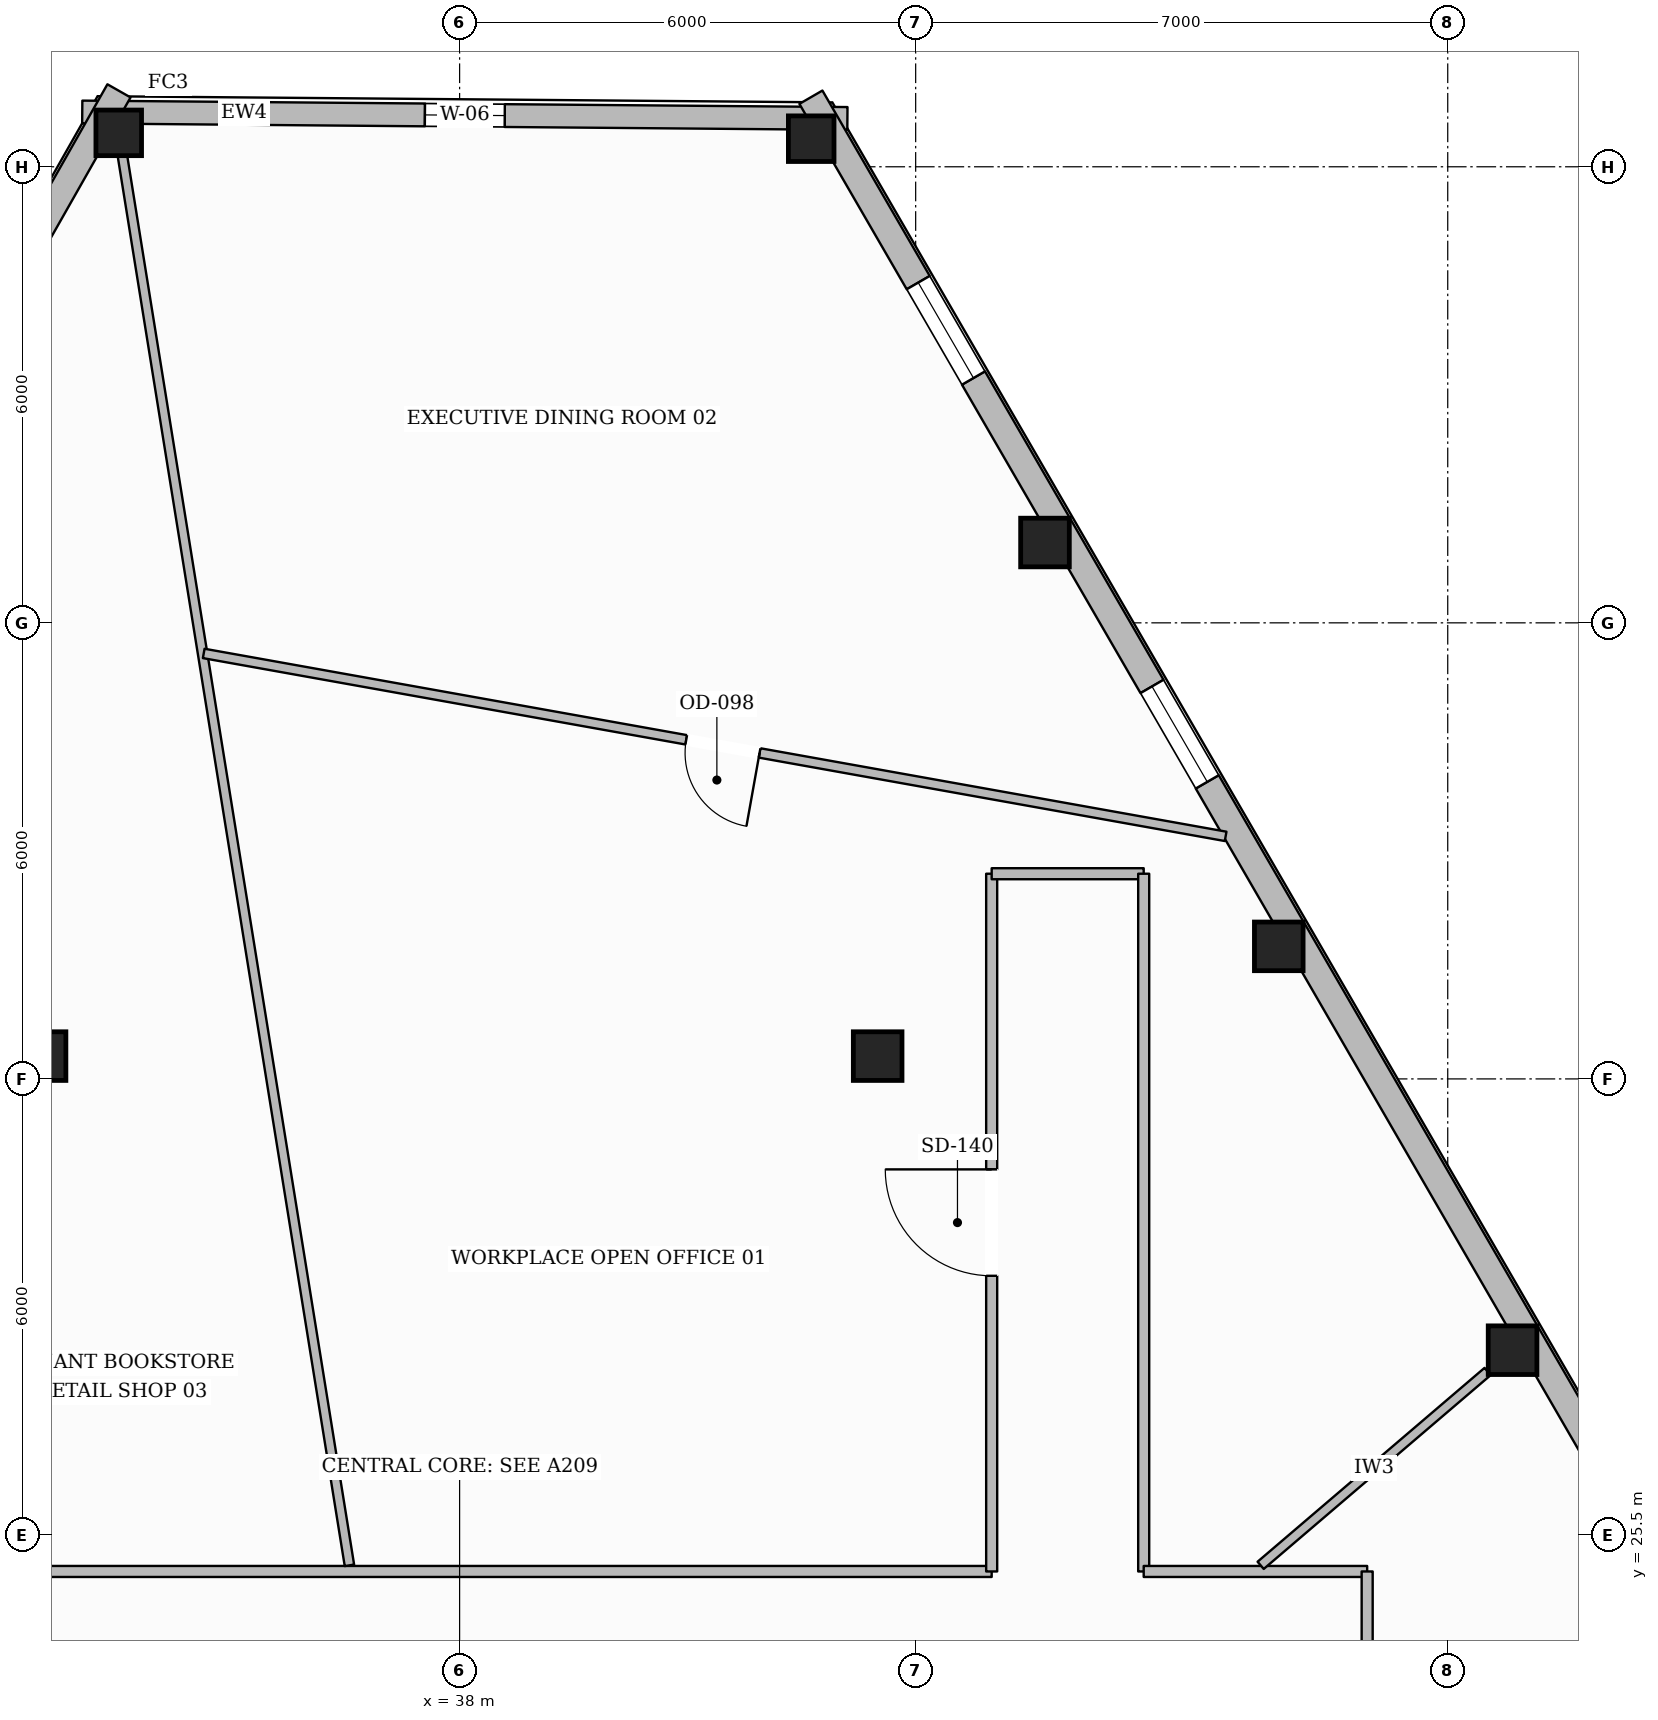
"""IFC4 building model, lengths in metres.
Left out: names, types, materials, properties, quantities, classifications, styles, units other than length and angle.
Written with IfcOpenShell. Run it as: python <this file> out.ifc"""

import sys

from ifc_helpers import new_model, si_unit, direction, frame, frame_2d, origin, origin_2d, place, context, subcontext, project, spatial, rectangle, hollow_rectangle, extrude, element, fill, save


model = new_model("IFC4")
c1 = context("Model", 3, precision=1e-05, world=origin(), true_north=direction((0.0, 1.0)))
c2 = subcontext(c1, "Body", "Model", "MODEL_VIEW")
j1 = project(units=[si_unit("LENGTHUNIT", "METRE"), si_unit("PLANEANGLEUNIT", "RADIAN")], contexts=[c1])
p1 = place(None, origin())
s1 = spatial("IfcSite", under=j1, at=p1, CompositionType="ELEMENT")
p2 = place(p1, origin())
s2 = spatial("IfcBuilding", under=s1, at=p2, CompositionType="ELEMENT")
p3 = place(p2, frame((0.0, 0.0, 176.55)))
s3 = spatial("IfcBuildingStorey", under=s2, at=p3, CompositionType="ELEMENT", Elevation=176.55)
p4 = place(p3, frame((33.515, 43.946, 0.0), z_axis=(0.0, 0.0, 1.0), x_axis=(1.0, 0.0, 0.0)))
e1 = element("IfcColumn", 1, at=p4, inside=s3, PredefinedType="COLUMN", context=c2, shape_type="SweptSolid", body=[
    extrude(hollow_rectangle(XDim=0.6, YDim=0.6, WallThickness=0.028, at=origin_2d()), origin(), (0.0, 0.0, 1.0), 3.6),
])
for number, where, z_axis, x_axis in (
    (2, (51.853, 27.931, 0.0), (0.0, 0.0, 1.0), (1.0, 0.0, 0.0)),
    (3, (48.777, 33.244, 0.0), (0.0, 0.0, 1.0), (1.0, 0.0, 0.0)),
    (4, (45.701, 38.557, 0.0), (0.0, 0.0, 1.0), (1.0, 0.0, 0.0)),
):
    element("IfcColumn", number, at=place(p3, frame(where, z_axis=z_axis, x_axis=x_axis)), inside=s3, PredefinedType="COLUMN", context=c2, shape_type="SweptSolid", body=[
        extrude(hollow_rectangle(XDim=0.64, YDim=0.64, WallThickness=0.028, at=origin_2d()), origin(), (0.0, 0.0, 1.0), 3.6),
    ])
p5 = place(p3, frame((42.625, 43.869, 0.0), z_axis=(0.0, 0.0, 1.0), x_axis=(1.0, 0.0, 0.0)))
e5 = element("IfcColumn", 5, at=p5, inside=s3, PredefinedType="COLUMN", context=c2, shape_type="SweptSolid", body=[
    extrude(hollow_rectangle(XDim=0.6, YDim=0.6, WallThickness=0.028, at=origin_2d()), origin(), (0.0, 0.0, 1.0), 3.6),
])
for number, where, z_axis, x_axis in (
    (6, (32.5, 31.8, 0.0), (0.0, 0.0, 1.0), (1.0, 0.0, 0.0)),
    (7, (43.5, 31.8, 0.0), (0.0, 0.0, 1.0), (1.0, 0.0, 0.0)),
):
    element("IfcColumn", number, at=place(p3, frame(where, z_axis=z_axis, x_axis=x_axis)), inside=s3, PredefinedType="COLUMN", context=c2, shape_type="SweptSolid", body=[
        extrude(hollow_rectangle(XDim=0.64, YDim=0.64, WallThickness=0.028, at=origin_2d()), origin(), (0.0, 0.0, 1.0), 3.6),
    ])
p6 = place(p3, frame((33.035, 44.22, 0.0), z_axis=(0.0, 0.0, 1.0), x_axis=(0.99996458909, -0.008415495547, 0.0)))
e8 = element("IfcWall", 8, at=p6, inside=s3, PredefinedType="STANDARD", context=c2, shape_type="SweptSolid", body=[
    extrude(rectangle(XDim=10.067, YDim=0.3, at=frame_2d((5.033, 0.0))), origin(), (0.0, 0.0, 1.0), 3.132),
])
p7 = place(p6, frame((4.508, 0.0, 0.65)))
e9 = element("IfcOpeningElement", 9, at=p7, cuts=e8, PredefinedType="OPENING", context=c2, shape_type="SweptSolid", body=[
    extrude(rectangle(XDim=1.05, YDim=1.7, at=frame_2d((0.525, 0.85))), frame((0.0, 0.16, 0.0), z_axis=(0.0, -1.0, 0.0), x_axis=(1.0, 0.0, 0.0)), (0.0, 0.0, 1.0), 0.32),
])
p8 = place(p3, frame((15.13, 12.109, 0.0), z_axis=(0.0, 0.0, 1.0), x_axis=(0.493717133856, 0.869622557054, 0.0)))
e10 = element("IfcWall", 10, at=p8, inside=s3, PredefinedType="STANDARD", context=c2, shape_type="SweptSolid", body=[
    extrude(rectangle(XDim=37.245, YDim=0.35, at=frame_2d((18.623, 0.0))), origin(), (0.0, 0.0, 1.0), 3.132),
])
p9 = place(p8, frame((27.334, 0.0, 0.0)))
e11 = element("IfcOpeningElement", 11, at=p9, cuts=e10, PredefinedType="OPENING", context=c2, shape_type="SweptSolid", body=[
    extrude(rectangle(XDim=1.0, YDim=2.2, at=frame_2d((0.5, 1.1))), frame((0.0, 0.185, 0.0), z_axis=(0.0, -1.0, 0.0), x_axis=(1.0, 0.0, 0.0)), (0.0, 0.0, 1.0), 0.37),
])
p10 = place(p8, frame((33.014, 0.0, 0.65)))
e12 = element("IfcOpeningElement", 12, at=p10, cuts=e10, PredefinedType="OPENING", context=c2, shape_type="SweptSolid", body=[
    extrude(rectangle(XDim=1.45, YDim=1.75, at=frame_2d((0.725, 0.875))), frame((0.0, 0.185, 0.0), z_axis=(0.0, -1.0, 0.0), x_axis=(1.0, 0.0, 0.0)), (0.0, 0.0, 1.0), 0.37),
])
p11 = place(p8, frame((20.918, 0.0, 0.65)))
e13 = element("IfcOpeningElement", 13, at=p11, cuts=e10, PredefinedType="OPENING", context=c2, shape_type="SweptSolid", body=[
    extrude(rectangle(XDim=1.45, YDim=1.75, at=frame_2d((0.725, 0.875))), frame((0.0, 0.185, 0.0), z_axis=(0.0, -1.0, 0.0), x_axis=(1.0, 0.0, 0.0)), (0.0, 0.0, 1.0), 0.37),
])
p12 = place(p8, frame((8.822, 0.0, 0.65)))
e14 = element("IfcOpeningElement", 14, at=p12, cuts=e10, PredefinedType="OPENING", context=c2, shape_type="SweptSolid", body=[
    extrude(rectangle(XDim=1.45, YDim=1.75, at=frame_2d((0.725, 0.875))), frame((0.0, 0.185, 0.0), z_axis=(0.0, -1.0, 0.0), x_axis=(1.0, 0.0, 0.0)), (0.0, 0.0, 1.0), 0.37),
])
p13 = place(p8, frame((2.774, 0.0, 0.65)))
e15 = element("IfcOpeningElement", 15, at=p13, cuts=e10, PredefinedType="OPENING", context=c2, shape_type="SweptSolid", body=[
    extrude(rectangle(XDim=1.45, YDim=1.75, at=frame_2d((0.725, 0.875))), frame((0.0, 0.185, 0.0), z_axis=(0.0, -1.0, 0.0), x_axis=(1.0, 0.0, 0.0)), (0.0, 0.0, 1.0), 0.37),
])
p14 = place(p3, frame((42.622, 44.415, 0.0), z_axis=(0.0, 0.0, 1.0), x_axis=(0.501018185811, -0.865436755336, 0.0)))
e16 = element("IfcWall", 16, at=p14, inside=s3, PredefinedType="STANDARD", context=c2, shape_type="SweptSolid", body=[
    extrude(rectangle(XDim=37.783, YDim=0.35, at=frame_2d((18.892, 0.0))), origin(), (0.0, 0.0, 1.0), 3.132),
])
p15 = place(p14, frame((27.737, 0.0, 0.0)))
e17 = element("IfcOpeningElement", 17, at=p15, cuts=e16, PredefinedType="OPENING", context=c2, shape_type="SweptSolid", body=[
    extrude(rectangle(XDim=1.0, YDim=2.2, at=frame_2d((0.5, 1.1))), frame((0.0, 0.185, 0.0), z_axis=(0.0, -1.0, 0.0), x_axis=(1.0, 0.0, 0.0)), (0.0, 0.0, 1.0), 0.37),
])
p16 = place(p14, frame((33.513, 0.0, 0.65)))
e18 = element("IfcOpeningElement", 18, at=p16, cuts=e16, PredefinedType="OPENING", context=c2, shape_type="SweptSolid", body=[
    extrude(rectangle(XDim=1.45, YDim=1.75, at=frame_2d((0.725, 0.875))), frame((0.0, 0.185, 0.0), z_axis=(0.0, -1.0, 0.0), x_axis=(1.0, 0.0, 0.0)), (0.0, 0.0, 1.0), 0.37),
])
p17 = place(p14, frame((21.235, 0.0, 0.65)))
e19 = element("IfcOpeningElement", 19, at=p17, cuts=e16, PredefinedType="OPENING", context=c2, shape_type="SweptSolid", body=[
    extrude(rectangle(XDim=1.45, YDim=1.75, at=frame_2d((0.725, 0.875))), frame((0.0, 0.185, 0.0), z_axis=(0.0, -1.0, 0.0), x_axis=(1.0, 0.0, 0.0)), (0.0, 0.0, 1.0), 0.37),
])
p18 = place(p14, frame((8.958, 0.0, 0.65)))
e20 = element("IfcOpeningElement", 20, at=p18, cuts=e16, PredefinedType="OPENING", context=c2, shape_type="SweptSolid", body=[
    extrude(rectangle(XDim=1.45, YDim=1.75, at=frame_2d((0.725, 0.875))), frame((0.0, 0.185, 0.0), z_axis=(0.0, -1.0, 0.0), x_axis=(1.0, 0.0, 0.0)), (0.0, 0.0, 1.0), 0.37),
])
p19 = place(p14, frame((2.819, 0.0, 0.65)))
e21 = element("IfcOpeningElement", 21, at=p19, cuts=e16, PredefinedType="OPENING", context=c2, shape_type="SweptSolid", body=[
    extrude(rectangle(XDim=1.45, YDim=1.75, at=frame_2d((0.725, 0.875))), frame((0.0, 0.185, 0.0), z_axis=(0.0, -1.0, 0.0), x_axis=(1.0, 0.0, 0.0)), (0.0, 0.0, 1.0), 0.37),
])
p20 = place(p3, frame((31.0, 25.02, 0.0), z_axis=(0.0, 0.0, 1.0), x_axis=(1.0, 0.0, 0.0)))
e22 = element("IfcWall", 22, at=p20, inside=s3, PredefinedType="PARTITIONING", context=c2, shape_type="SweptSolid", body=[
    extrude(rectangle(XDim=14.0, YDim=0.145, at=frame_2d((7.0, 0.0))), origin(), (0.0, 0.0, 1.0), 3.6),
])
p21 = place(p3, frame((45.0, 25.02, 0.0), z_axis=(0.0, 0.0, 1.0), x_axis=(0.0, 1.0, 0.0)))
e23 = element("IfcWall", 23, at=p21, inside=s3, PredefinedType="PARTITIONING", context=c2, shape_type="SweptSolid", body=[
    extrude(rectangle(XDim=9.179, YDim=0.145, at=frame_2d((4.59, 0.0))), origin(), (0.0, 0.0, 1.0), 3.6),
])
p22 = place(p21, frame((3.89, 0.0, 0.0)))
e24 = element("IfcOpeningElement", 24, at=p22, cuts=e23, PredefinedType="OPENING", context=c2, shape_type="SweptSolid", body=[
    extrude(rectangle(XDim=1.4, YDim=2.2, at=frame_2d((0.7, 1.1))), frame((0.0, 0.083, 0.0), z_axis=(0.0, -1.0, 0.0), x_axis=(1.0, 0.0, 0.0)), (0.0, 0.0, 1.0), 0.165),
])
p23 = place(p3, frame((45.0, 34.199, 0.0), z_axis=(0.0, 0.0, 1.0), x_axis=(1.0, 0.0, 0.0)))
e25 = element("IfcWall", 25, at=p23, inside=s3, PredefinedType="PARTITIONING", context=c2, shape_type="SweptSolid", body=[
    extrude(rectangle(XDim=2.0, YDim=0.145, at=frame_2d((1.0, 0.0))), origin(), (0.0, 0.0, 1.0), 3.6),
])
p24 = place(p3, frame((47.0, 34.199, 0.0), z_axis=(0.0, 0.0, 1.0), x_axis=(0.0, -1.0, 0.0)))
e26 = element("IfcWall", 26, at=p24, inside=s3, PredefinedType="PARTITIONING", context=c2, shape_type="SweptSolid", body=[
    extrude(rectangle(XDim=9.179, YDim=0.145, at=frame_2d((4.59, 0.0))), origin(), (0.0, 0.0, 1.0), 3.6),
])
p25 = place(p3, frame((47.0, 25.02, 0.0), z_axis=(0.0, 0.0, 1.0), x_axis=(1.0, 0.0, 0.0)))
e27 = element("IfcWall", 27, at=p25, inside=s3, PredefinedType="PARTITIONING", context=c2, shape_type="SweptSolid", body=[
    extrude(rectangle(XDim=2.94, YDim=0.145, at=frame_2d((1.47, 0.0))), origin(), (0.0, 0.0, 1.0), 3.6),
])
p26 = place(p3, frame((49.94, 25.02, 0.0), z_axis=(0.0, 0.0, 1.0), x_axis=(0.0, -1.0, 0.0)))
e28 = element("IfcWall", 28, at=p26, inside=s3, PredefinedType="PARTITIONING", context=c2, shape_type="SweptSolid", body=[
    extrude(rectangle(XDim=7.92, YDim=0.145, at=frame_2d((3.96, 0.0))), origin(), (0.0, 0.0, 1.0), 3.339),
])
p27 = place(p26, frame((3.26, 0.0, 0.0)))
e29 = element("IfcOpeningElement", 29, at=p27, cuts=e28, PredefinedType="OPENING", context=c2, shape_type="SweptSolid", body=[
    extrude(rectangle(XDim=1.4, YDim=2.2, at=frame_2d((0.7, 1.1))), frame((0.0, 0.083, 0.0), z_axis=(0.0, -1.0, 0.0), x_axis=(1.0, 0.0, 0.0)), (0.0, 0.0, 1.0), 0.165),
])
p28 = place(p3, frame((48.539, 25.101, 0.0), z_axis=(0.0, 0.0, 1.0), x_axis=(0.760440194852, 0.649407968887, 0.0)))
e30 = element("IfcWall", 30, at=p28, inside=s3, PredefinedType="PARTITIONING", context=c2, shape_type="SweptSolid", body=[
    extrude(rectangle(XDim=3.927, YDim=0.125, at=frame_2d((1.963, 0.0))), origin(), (0.0, 0.0, 1.0), 3.141),
])
p29 = place(p3, frame((36.551, 25.101, 0.0), z_axis=(0.0, 0.0, 1.0), x_axis=(-0.159007186036, 0.987277425443, 0.0)))
e31 = element("IfcWall", 31, at=p29, inside=s3, PredefinedType="PARTITIONING", context=c2, shape_type="SweptSolid", body=[
    extrude(rectangle(XDim=18.776, YDim=0.125, at=frame_2d((9.388, 0.0))), origin(), (0.0, 0.0, 1.0), 3.141),
])
p30 = place(p3, frame((48.078, 34.691, 0.0), z_axis=(0.0, 0.0, 1.0), x_axis=(-0.984351918165, 0.176213794023, 0.0)))
e32 = element("IfcWall", 32, at=p30, inside=s3, PredefinedType="PARTITIONING", context=c2, shape_type="SweptSolid", body=[
    extrude(rectangle(XDim=13.658, YDim=0.125, at=frame_2d((6.829, 0.0))), origin(), (0.0, 0.0, 1.0), 3.6),
])
p31 = place(p30, frame((6.229, 0.0, 0.0)))
e33 = element("IfcOpeningElement", 33, at=p31, cuts=e32, PredefinedType="OPENING", context=c2, shape_type="SweptSolid", body=[
    extrude(rectangle(XDim=0.98, YDim=2.15, at=frame_2d((0.49, 1.075))), frame((0.0, 0.073, 0.0), z_axis=(0.0, -1.0, 0.0), x_axis=(1.0, 0.0, 0.0)), (0.0, 0.0, 1.0), 0.145),
])
p32 = place(p18, origin())
e34 = element("IfcWindow", 34, at=p32, inside=s3, PartitioningType="SINGLE_PANEL", PredefinedType="WINDOW", context=c2, shape_type="SweptSolid", body=[
    extrude(rectangle(XDim=1.45, YDim=1.75, at=frame_2d((0.725, 0.875))), frame((0.0, 0.03, 0.0), z_axis=(0.0, -1.0, 0.0), x_axis=(1.0, 0.0, 0.0)), (0.0, 0.0, 1.0), 0.06),
])
fill(e20, e34)
p33 = place(p19, origin())
e35 = element("IfcWindow", 35, at=p33, inside=s3, PartitioningType="SINGLE_PANEL", PredefinedType="WINDOW", context=c2, shape_type="SweptSolid", body=[
    extrude(rectangle(XDim=1.45, YDim=1.75, at=frame_2d((0.725, 0.875))), frame((0.0, 0.03, 0.0), z_axis=(0.0, -1.0, 0.0), x_axis=(1.0, 0.0, 0.0)), (0.0, 0.0, 1.0), 0.06),
])
fill(e21, e35)
p34 = place(p7, origin())
e36 = element("IfcWindow", 36, at=p34, inside=s3, PartitioningType="SINGLE_PANEL", PredefinedType="WINDOW", context=c2, shape_type="SweptSolid", body=[
    extrude(rectangle(XDim=1.05, YDim=1.7, at=frame_2d((0.525, 0.85))), frame((0.0, 0.03, 0.0), z_axis=(0.0, -1.0, 0.0), x_axis=(1.0, 0.0, 0.0)), (0.0, 0.0, 1.0), 0.06),
])
fill(e9, e36)
p35 = place(p22, origin())
e37 = element("IfcDoor", 37, at=p35, inside=s3, OperationType="SINGLE_SWING_RIGHT", PredefinedType="DOOR", context=c2, shape_type="SweptSolid", body=[
    extrude(rectangle(XDim=1.4, YDim=2.2, at=frame_2d((0.7, 1.1))), frame((0.0, 0.025, 0.0), z_axis=(0.0, -1.0, 0.0), x_axis=(1.0, 0.0, 0.0)), (0.0, 0.0, 1.0), 0.05),
])
fill(e24, e37)
p36 = place(p31, origin())
e38 = element("IfcDoor", 38, at=p36, inside=s3, OperationType="SINGLE_SWING_LEFT", PredefinedType="DOOR", context=c2, shape_type="SweptSolid", body=[
    extrude(rectangle(XDim=0.98, YDim=2.15, at=frame_2d((0.49, 1.075))), frame((0.0, 0.025, 0.0), z_axis=(0.0, -1.0, 0.0), x_axis=(1.0, 0.0, 0.0)), (0.0, 0.0, 1.0), 0.05),
])
fill(e33, e38)
save(model, sys.argv[1])
